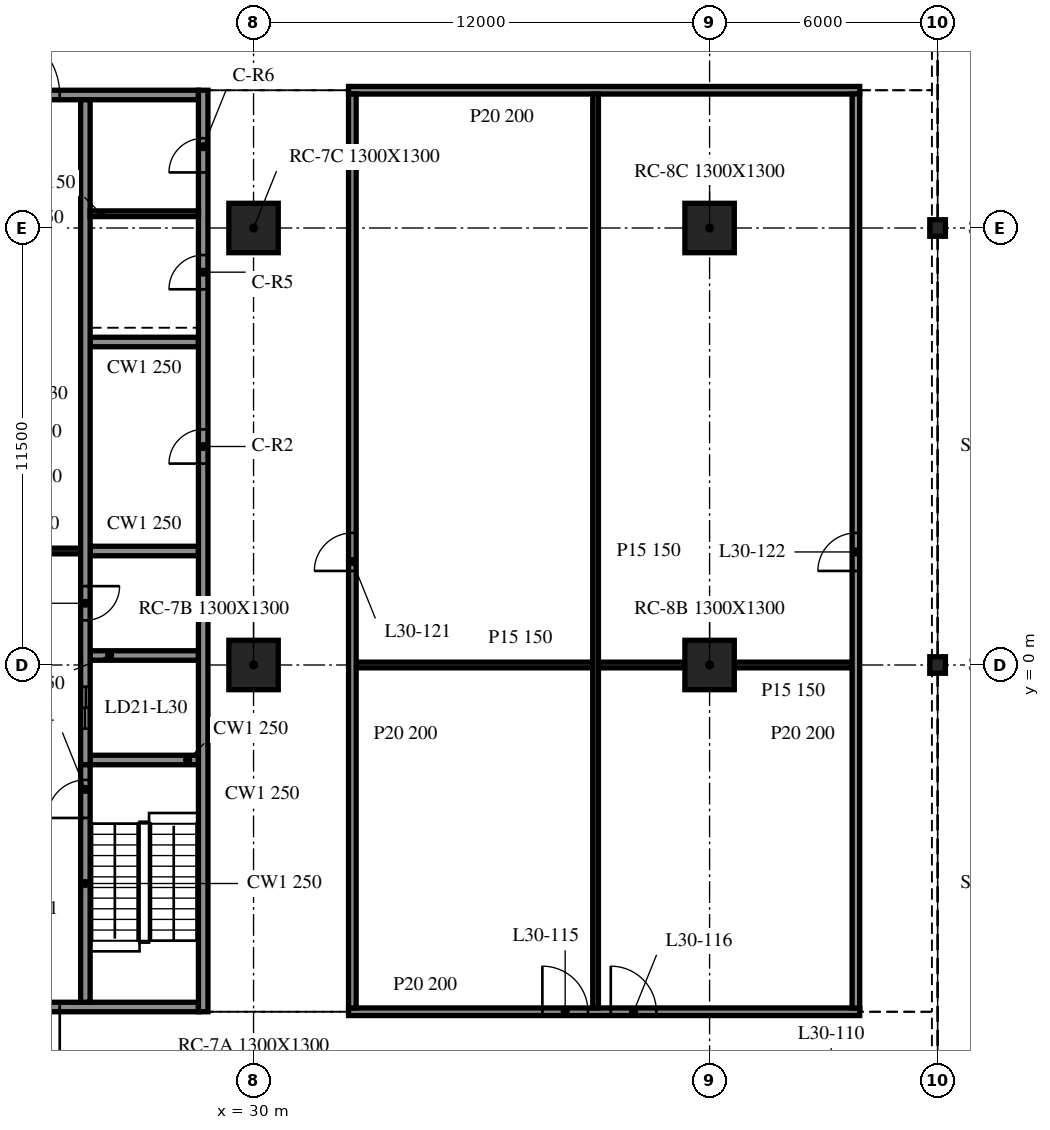
"""IFC4 building model, lengths in metres.
Left out: names, types, materials, properties, quantities, classifications, styles, units other than length and angle.
Written with IfcOpenShell. Run it as: python <this file> out.ifc"""

import sys

from ifc_helpers import new_model, si_unit, direction, frame, frame_2d, origin, origin_2d, place, context, subcontext, project, spatial, rectangle, i_section, extrude, element, fill, save


model = new_model("IFC4")
c1 = context("Model", 3, precision=1e-05, world=origin(), true_north=direction((0.0, 1.0)))
c2 = subcontext(c1, "Body", "Model", "MODEL_VIEW")
j1 = project(units=[si_unit("LENGTHUNIT", "METRE"), si_unit("PLANEANGLEUNIT", "RADIAN")], contexts=[c1])
p1 = place(None, origin())
s1 = spatial("IfcSite", under=j1, at=p1, CompositionType="ELEMENT")
p2 = place(p1, origin())
s2 = spatial("IfcBuilding", under=s1, at=p2, CompositionType="ELEMENT")
p3 = place(p2, frame((0.0, 0.0, 130.2)))
s3 = spatial("IfcBuildingStorey", under=s2, at=p3, CompositionType="ELEMENT", Elevation=130.2)
for number, where, z_axis, x_axis in (
    (1, (30.0, 0.0, -0.34), (0.0, 0.0, 1.0), (1.0, 0.0, 0.0)),
    (2, (30.0, 11.5, -0.34), (0.0, 0.0, 1.0), (1.0, 0.0, 0.0)),
    (3, (42.0, 0.0, -0.34), (0.0, 0.0, 1.0), (1.0, 0.0, 0.0)),
    (4, (42.0, 11.5, -0.34), (0.0, 0.0, 1.0), (1.0, 0.0, 0.0)),
):
    element("IfcColumn", number, at=place(p3, frame(where, z_axis=z_axis, x_axis=x_axis)), inside=s3, PredefinedType="COLUMN", context=c2, shape_type="SweptSolid", body=[
        extrude(rectangle(XDim=1.3, YDim=1.3, at=origin_2d()), origin(), (0.0, 0.0, 1.0), 4.1),
    ])
for number, where, z_axis, x_axis in (
    (5, (48.0, 0.0, -0.34), (0.0, 0.0, 1.0), (1.0, 0.0, 0.0)),
    (6, (48.0, 11.5, -0.34), (0.0, 0.0, 1.0), (1.0, 0.0, 0.0)),
):
    element("IfcColumn", number, at=place(p3, frame(where, z_axis=z_axis, x_axis=x_axis)), inside=s3, PredefinedType="COLUMN", context=c2, shape_type="SweptSolid", body=[
        extrude(i_section(OverallWidth=0.412, OverallDepth=0.434, WebThickness=0.036, FlangeThickness=0.057, at=origin_2d()), origin(), (0.0, 0.0, 1.0), 4.1),
    ])
p4 = place(p3, frame((28.675, -9.125, 0.0), z_axis=(0.0, 0.0, 1.0), x_axis=(0.0, 1.0, 0.0)))
e7 = element("IfcWall", 7, at=p4, inside=s3, PredefinedType="SOLIDWALL", context=c2, shape_type="SweptSolid", body=[
    extrude(rectangle(XDim=24.25, YDim=0.25, at=frame_2d((12.125, 0.0))), origin(), (0.0, 0.0, 1.0), 3.76),
])
p5 = place(p4, frame((14.425, 0.0, 0.0)))
e8 = element("IfcOpeningElement", 8, at=p5, cuts=e7, PredefinedType="OPENING", context=c2, shape_type="SweptSolid", body=[
    extrude(rectangle(XDim=0.9, YDim=2.1, at=frame_2d((0.45, 1.05))), frame((0.0, 0.135, 0.0), z_axis=(0.0, -1.0, 0.0), x_axis=(1.0, 0.0, 0.0)), (0.0, 0.0, 1.0), 0.27),
])
p6 = place(p4, frame((19.012, 0.0, 0.0)))
e9 = element("IfcOpeningElement", 9, at=p6, cuts=e7, PredefinedType="OPENING", context=c2, shape_type="SweptSolid", body=[
    extrude(rectangle(XDim=0.9, YDim=2.1, at=frame_2d((0.45, 1.05))), frame((0.0, 0.135, 0.0), z_axis=(0.0, -1.0, 0.0), x_axis=(1.0, 0.0, 0.0)), (0.0, 0.0, 1.0), 0.27),
])
p7 = place(p4, frame((22.087, 0.0, 0.0)))
e10 = element("IfcOpeningElement", 10, at=p7, cuts=e7, PredefinedType="OPENING", context=c2, shape_type="SweptSolid", body=[
    extrude(rectangle(XDim=0.9, YDim=2.1, at=frame_2d((0.45, 1.05))), frame((0.0, 0.135, 0.0), z_axis=(0.0, -1.0, 0.0), x_axis=(1.0, 0.0, 0.0)), (0.0, 0.0, 1.0), 0.27),
])
p8 = place(p3, frame((28.55, -9.0, 0.0), z_axis=(0.0, 0.0, 1.0), x_axis=(-1.0, 0.0, 0.0)))
e11 = element("IfcWall", 11, at=p8, inside=s3, PredefinedType="SOLIDWALL", context=c2, shape_type="SweptSolid", body=[
    extrude(rectangle(XDim=9.1, YDim=0.25, at=frame_2d((4.55, 0.0))), origin(), (0.0, 0.0, 1.0), 3.76),
])
p9 = place(p8, frame((3.65, 0.0, 0.0)))
e12 = element("IfcOpeningElement", 12, at=p9, cuts=e11, PredefinedType="OPENING", context=c2, shape_type="SweptSolid", body=[
    extrude(rectangle(XDim=1.8, YDim=2.1, at=frame_2d((0.9, 1.05))), frame((0.0, 0.135, 0.0), z_axis=(0.0, -1.0, 0.0), x_axis=(1.0, 0.0, 0.0)), (0.0, 0.0, 1.0), 0.27),
])
p10 = place(p3, frame((19.45, 15.0, 0.0), z_axis=(0.0, 0.0, 1.0), x_axis=(1.0, 0.0, 0.0)))
e13 = element("IfcWall", 13, at=p10, inside=s3, PredefinedType="SOLIDWALL", context=c2, shape_type="SweptSolid", body=[
    extrude(rectangle(XDim=9.1, YDim=0.25, at=frame_2d((4.55, 0.0))), origin(), (0.0, 0.0, 1.0), 3.76),
])
p11 = place(p10, frame((3.65, 0.0, 0.0)))
e14 = element("IfcOpeningElement", 14, at=p11, cuts=e13, PredefinedType="OPENING", context=c2, shape_type="SweptSolid", body=[
    extrude(rectangle(XDim=1.8, YDim=2.1, at=frame_2d((0.9, 1.05))), frame((0.0, 0.135, 0.0), z_axis=(0.0, -1.0, 0.0), x_axis=(1.0, 0.0, 0.0)), (0.0, 0.0, 1.0), 0.27),
])
p12 = place(p3, frame((25.575, -8.875, 0.0), z_axis=(0.0, 0.0, 1.0), x_axis=(0.0, 1.0, 0.0)))
e15 = element("IfcWall", 15, at=p12, inside=s3, PredefinedType="SOLIDWALL", context=c2, shape_type="SweptSolid", body=[
    extrude(rectangle(XDim=6.25, YDim=0.25, at=frame_2d((3.125, 0.0))), origin(), (0.0, 0.0, 1.0), 3.76),
])
p13 = place(p12, frame((4.85, 0.0, 0.0)))
e16 = element("IfcOpeningElement", 16, at=p13, cuts=e15, PredefinedType="OPENING", context=c2, shape_type="SweptSolid", body=[
    extrude(rectangle(XDim=1.0, YDim=2.1, at=frame_2d((0.5, 1.05))), frame((0.0, 0.135, 0.0), z_axis=(0.0, -1.0, 0.0), x_axis=(1.0, 0.0, 0.0)), (0.0, 0.0, 1.0), 0.27),
])
p14 = place(p3, frame((25.575, 14.875, 0.0), z_axis=(0.0, 0.0, 1.0), x_axis=(0.0, -1.0, 0.0)))
e17 = element("IfcWall", 17, at=p14, inside=s3, PredefinedType="SOLIDWALL", context=c2, shape_type="SweptSolid", body=[
    extrude(rectangle(XDim=17.5, YDim=0.25, at=frame_2d((8.75, 0.0))), origin(), (0.0, 0.0, 1.0), 3.76),
])
p15 = place(p14, frame((15.45, 0.0, 0.0)))
e18 = element("IfcOpeningElement", 18, at=p15, cuts=e17, PredefinedType="OPENING", context=c2, shape_type="SweptSolid", body=[
    extrude(rectangle(XDim=1.1, YDim=2.1, at=frame_2d((0.55, 1.05))), frame((0.0, 0.135, 0.0), z_axis=(0.0, -1.0, 0.0), x_axis=(1.0, 0.0, 0.0)), (0.0, 0.0, 1.0), 0.27),
])
p16 = place(p14, frame((12.8, 0.0, 0.0)))
e19 = element("IfcOpeningElement", 19, at=p16, cuts=e17, PredefinedType="OPENING", context=c2, shape_type="SweptSolid", body=[
    extrude(rectangle(XDim=0.9, YDim=2.1, at=frame_2d((0.45, 1.05))), frame((0.0, 0.135, 0.0), z_axis=(0.0, -1.0, 0.0), x_axis=(1.0, 0.0, 0.0)), (0.0, 0.0, 1.0), 0.27),
])
for number, where, z_axis, x_axis in (
    (20, (25.7, -2.5, 0.0), (0.0, 0.0, 1.0), (1.0, 0.0, 0.0)),
    (21, (25.7, 0.25, 0.0), (0.0, 0.0, 1.0), (1.0, 0.0, 0.0)),
    (22, (25.7, 3.0, 0.0), (0.0, 0.0, 1.0), (1.0, 0.0, 0.0)),
    (23, (25.7, 8.5, 0.0), (0.0, 0.0, 1.0), (1.0, 0.0, 0.0)),
):
    element("IfcWall", number, at=place(p3, frame(where, z_axis=z_axis, x_axis=x_axis)), inside=s3, PredefinedType="SOLIDWALL", context=c2, shape_type="SweptSolid", body=[
        extrude(rectangle(XDim=2.85, YDim=0.25, at=frame_2d((1.425, 0.0))), origin(), (0.0, 0.0, 1.0), 3.76),
    ])
p17 = place(p3, frame((22.55, 3.0, 0.0), z_axis=(0.0, 0.0, 1.0), x_axis=(1.0, 0.0, 0.0)))
e24 = element("IfcWall", 24, at=p17, inside=s3, PredefinedType="PARTITIONING", context=c2, shape_type="SweptSolid", body=[
    extrude(rectangle(XDim=2.9, YDim=0.15, at=frame_2d((1.45, 0.0))), origin(), (0.0, 0.0, 1.0), 3.76),
])
p18 = place(p3, frame((25.7, 11.875, 0.0), z_axis=(0.0, 0.0, 1.0), x_axis=(1.0, 0.0, 0.0)))
e25 = element("IfcWall", 25, at=p18, inside=s3, PredefinedType="PARTITIONING", context=c2, shape_type="SweptSolid", body=[
    extrude(rectangle(XDim=2.85, YDim=0.15, at=frame_2d((1.425, 0.0))), origin(), (0.0, 0.0, 1.0), 3.76),
])
p19 = place(p3, frame((32.5, -9.125, 0.0), z_axis=(0.0, 0.0, 1.0), x_axis=(1.0, 0.0, 0.0)))
e26 = element("IfcWall", 26, at=p19, inside=s3, PredefinedType="PARTITIONING", context=c2, shape_type="SweptSolid", body=[
    extrude(rectangle(XDim=13.45, YDim=0.2, at=frame_2d((6.725, 0.0))), origin(), (0.0, 0.0, 1.0), 3.76),
])
p20 = place(p19, frame((5.1, 0.0, 0.0)))
e27 = element("IfcOpeningElement", 27, at=p20, cuts=e26, PredefinedType="OPENING", context=c2, shape_type="SweptSolid", body=[
    extrude(rectangle(XDim=1.2, YDim=2.1, at=frame_2d((0.6, 1.05))), frame((0.0, 0.11, 0.0), z_axis=(0.0, -1.0, 0.0), x_axis=(1.0, 0.0, 0.0)), (0.0, 0.0, 1.0), 0.22),
])
p21 = place(p19, frame((6.9, 0.0, 0.0)))
e28 = element("IfcOpeningElement", 28, at=p21, cuts=e26, PredefinedType="OPENING", context=c2, shape_type="SweptSolid", body=[
    extrude(rectangle(XDim=1.2, YDim=2.1, at=frame_2d((0.6, 1.05))), frame((0.0, 0.11, 0.0), z_axis=(0.0, -1.0, 0.0), x_axis=(1.0, 0.0, 0.0)), (0.0, 0.0, 1.0), 0.22),
])
p22 = place(p3, frame((32.7, 0.0, 0.0), z_axis=(0.0, 0.0, 1.0), x_axis=(1.0, 0.0, 0.0)))
e29 = element("IfcWall", 29, at=p22, inside=s3, PredefinedType="PARTITIONING", context=c2, shape_type="SweptSolid", body=[
    extrude(rectangle(XDim=8.65, YDim=0.15, at=frame_2d((4.325, 0.0))), origin(), (0.0, 0.0, 1.0), 3.76),
])
p23 = place(p3, frame((42.65, 0.0, 0.0), z_axis=(0.0, 0.0, 1.0), x_axis=(1.0, 0.0, 0.0)))
e30 = element("IfcWall", 30, at=p23, inside=s3, PredefinedType="PARTITIONING", context=c2, shape_type="SweptSolid", body=[
    extrude(rectangle(XDim=3.1, YDim=0.15, at=frame_2d((1.55, 0.0))), origin(), (0.0, 0.0, 1.0), 3.76),
])
p24 = place(p3, frame((32.5, 15.125, 0.0), z_axis=(0.0, 0.0, 1.0), x_axis=(1.0, 0.0, 0.0)))
e31 = element("IfcWall", 31, at=p24, inside=s3, PredefinedType="PARTITIONING", context=c2, shape_type="SweptSolid", body=[
    extrude(rectangle(XDim=13.45, YDim=0.2, at=frame_2d((6.725, 0.0))), origin(), (0.0, 0.0, 1.0), 3.76),
])
p25 = place(p3, frame((32.6, -9.025, 0.0), z_axis=(0.0, 0.0, 1.0), x_axis=(0.0, 1.0, 0.0)))
e32 = element("IfcWall", 32, at=p25, inside=s3, PredefinedType="PARTITIONING", context=c2, shape_type="SweptSolid", body=[
    extrude(rectangle(XDim=24.05, YDim=0.2, at=frame_2d((12.025, 0.0))), origin(), (0.0, 0.0, 1.0), 3.76),
])
p26 = place(p25, frame((11.5, 0.0, 0.0)))
e33 = element("IfcOpeningElement", 33, at=p26, cuts=e32, PredefinedType="OPENING", context=c2, shape_type="SweptSolid", body=[
    extrude(rectangle(XDim=1.0, YDim=2.1, at=frame_2d((0.5, 1.05))), frame((0.0, 0.11, 0.0), z_axis=(0.0, -1.0, 0.0), x_axis=(1.0, 0.0, 0.0)), (0.0, 0.0, 1.0), 0.22),
])
p27 = place(p3, frame((39.0, -9.025, 0.0), z_axis=(0.0, 0.0, 1.0), x_axis=(0.0, 1.0, 0.0)))
e34 = element("IfcWall", 34, at=p27, inside=s3, PredefinedType="PARTITIONING", context=c2, shape_type="SweptSolid", body=[
    extrude(rectangle(XDim=24.05, YDim=0.15, at=frame_2d((12.025, 0.0))), origin(), (0.0, 0.0, 1.0), 3.76),
])
p28 = place(p3, frame((45.85, -9.025, 0.0), z_axis=(0.0, 0.0, 1.0), x_axis=(0.0, 1.0, 0.0)))
e35 = element("IfcWall", 35, at=p28, inside=s3, PredefinedType="PARTITIONING", context=c2, shape_type="SweptSolid", body=[
    extrude(rectangle(XDim=24.05, YDim=0.2, at=frame_2d((12.025, 0.0))), origin(), (0.0, 0.0, 1.0), 3.76),
])
p29 = place(p28, frame((11.5, 0.0, 0.0)))
e36 = element("IfcOpeningElement", 36, at=p29, cuts=e35, PredefinedType="OPENING", context=c2, shape_type="SweptSolid", body=[
    extrude(rectangle(XDim=1.0, YDim=2.1, at=frame_2d((0.5, 1.05))), frame((0.0, 0.11, 0.0), z_axis=(0.0, -1.0, 0.0), x_axis=(1.0, 0.0, 0.0)), (0.0, 0.0, 1.0), 0.22),
])
p30 = place(p9, origin())
e37 = element("IfcDoor", 37, at=p30, inside=s3, OperationType="DOUBLE_DOOR_SINGLE_SWING", PredefinedType="DOOR", context=c2, shape_type="SweptSolid", body=[
    extrude(rectangle(XDim=1.8, YDim=2.1, at=frame_2d((0.9, 1.05))), frame((0.0, 0.025, 0.0), z_axis=(0.0, -1.0, 0.0), x_axis=(1.0, 0.0, 0.0)), (0.0, 0.0, 1.0), 0.05),
])
fill(e12, e37)
p31 = place(p11, origin())
e38 = element("IfcDoor", 38, at=p31, inside=s3, OperationType="DOUBLE_DOOR_SINGLE_SWING", PredefinedType="DOOR", context=c2, shape_type="SweptSolid", body=[
    extrude(rectangle(XDim=1.8, YDim=2.1, at=frame_2d((0.9, 1.05))), frame((0.0, 0.025, 0.0), z_axis=(0.0, -1.0, 0.0), x_axis=(1.0, 0.0, 0.0)), (0.0, 0.0, 1.0), 0.05),
])
fill(e14, e38)
p32 = place(p15, origin())
e39 = element("IfcDoor", 39, at=p32, inside=s3, OperationType="DOUBLE_DOOR_SLIDING", PredefinedType="DOOR", context=c2, shape_type="SweptSolid", body=[
    extrude(rectangle(XDim=1.1, YDim=2.1, at=frame_2d((0.55, 1.05))), frame((0.0, 0.025, 0.0), z_axis=(0.0, -1.0, 0.0), x_axis=(1.0, 0.0, 0.0)), (0.0, 0.0, 1.0), 0.05),
])
fill(e18, e39)
p33 = place(p16, origin())
e40 = element("IfcDoor", 40, at=p33, inside=s3, OperationType="SINGLE_SWING_LEFT", PredefinedType="DOOR", context=c2, shape_type="SweptSolid", body=[
    extrude(rectangle(XDim=0.9, YDim=2.1, at=frame_2d((0.45, 1.05))), frame((0.0, 0.025, 0.0), z_axis=(0.0, -1.0, 0.0), x_axis=(1.0, 0.0, 0.0)), (0.0, 0.0, 1.0), 0.05),
])
fill(e19, e40)
p34 = place(p5, origin())
e41 = element("IfcDoor", 41, at=p34, inside=s3, OperationType="SINGLE_SWING_RIGHT", PredefinedType="DOOR", context=c2, shape_type="SweptSolid", body=[
    extrude(rectangle(XDim=0.9, YDim=2.1, at=frame_2d((0.45, 1.05))), frame((0.0, 0.025, 0.0), z_axis=(0.0, -1.0, 0.0), x_axis=(1.0, 0.0, 0.0)), (0.0, 0.0, 1.0), 0.05),
])
fill(e8, e41)
p35 = place(p6, origin())
e42 = element("IfcDoor", 42, at=p35, inside=s3, OperationType="SINGLE_SWING_LEFT", PredefinedType="DOOR", context=c2, shape_type="SweptSolid", body=[
    extrude(rectangle(XDim=0.9, YDim=2.1, at=frame_2d((0.45, 1.05))), frame((0.0, 0.025, 0.0), z_axis=(0.0, -1.0, 0.0), x_axis=(1.0, 0.0, 0.0)), (0.0, 0.0, 1.0), 0.05),
])
fill(e9, e42)
p36 = place(p7, origin())
e43 = element("IfcDoor", 43, at=p36, inside=s3, OperationType="SINGLE_SWING_RIGHT", PredefinedType="DOOR", context=c2, shape_type="SweptSolid", body=[
    extrude(rectangle(XDim=0.9, YDim=2.1, at=frame_2d((0.45, 1.05))), frame((0.0, 0.025, 0.0), z_axis=(0.0, -1.0, 0.0), x_axis=(1.0, 0.0, 0.0)), (0.0, 0.0, 1.0), 0.05),
])
fill(e10, e43)
p37 = place(p13, origin())
e44 = element("IfcDoor", 44, at=p37, inside=s3, OperationType="SINGLE_SWING_RIGHT", PredefinedType="DOOR", context=c2, shape_type="SweptSolid", body=[
    extrude(rectangle(XDim=1.0, YDim=2.1, at=frame_2d((0.5, 1.05))), frame((0.0, 0.025, 0.0), z_axis=(0.0, -1.0, 0.0), x_axis=(1.0, 0.0, 0.0)), (0.0, 0.0, 1.0), 0.05),
])
fill(e16, e44)
p38 = place(p20, origin())
e45 = element("IfcDoor", 45, at=p38, inside=s3, OperationType="SINGLE_SWING_LEFT", PredefinedType="DOOR", context=c2, shape_type="SweptSolid", body=[
    extrude(rectangle(XDim=1.2, YDim=2.1, at=frame_2d((0.6, 1.05))), frame((0.0, 0.025, 0.0), z_axis=(0.0, -1.0, 0.0), x_axis=(1.0, 0.0, 0.0)), (0.0, 0.0, 1.0), 0.05),
])
fill(e27, e45)
p39 = place(p21, origin())
e46 = element("IfcDoor", 46, at=p39, inside=s3, OperationType="SINGLE_SWING_RIGHT", PredefinedType="DOOR", context=c2, shape_type="SweptSolid", body=[
    extrude(rectangle(XDim=1.2, YDim=2.1, at=frame_2d((0.6, 1.05))), frame((0.0, 0.025, 0.0), z_axis=(0.0, -1.0, 0.0), x_axis=(1.0, 0.0, 0.0)), (0.0, 0.0, 1.0), 0.05),
])
fill(e28, e46)
p40 = place(p26, origin())
e47 = element("IfcDoor", 47, at=p40, inside=s3, OperationType="SINGLE_SWING_RIGHT", PredefinedType="DOOR", context=c2, shape_type="SweptSolid", body=[
    extrude(rectangle(XDim=1.0, YDim=2.1, at=frame_2d((0.5, 1.05))), frame((0.0, 0.025, 0.0), z_axis=(0.0, -1.0, 0.0), x_axis=(1.0, 0.0, 0.0)), (0.0, 0.0, 1.0), 0.05),
])
fill(e33, e47)
p41 = place(p29, origin())
e48 = element("IfcDoor", 48, at=p41, inside=s3, OperationType="SINGLE_SWING_LEFT", PredefinedType="DOOR", context=c2, shape_type="SweptSolid", body=[
    extrude(rectangle(XDim=1.0, YDim=2.1, at=frame_2d((0.5, 1.05))), frame((0.0, 0.025, 0.0), z_axis=(0.0, -1.0, 0.0), x_axis=(1.0, 0.0, 0.0)), (0.0, 0.0, 1.0), 0.05),
])
fill(e36, e48)
save(model, sys.argv[1])
